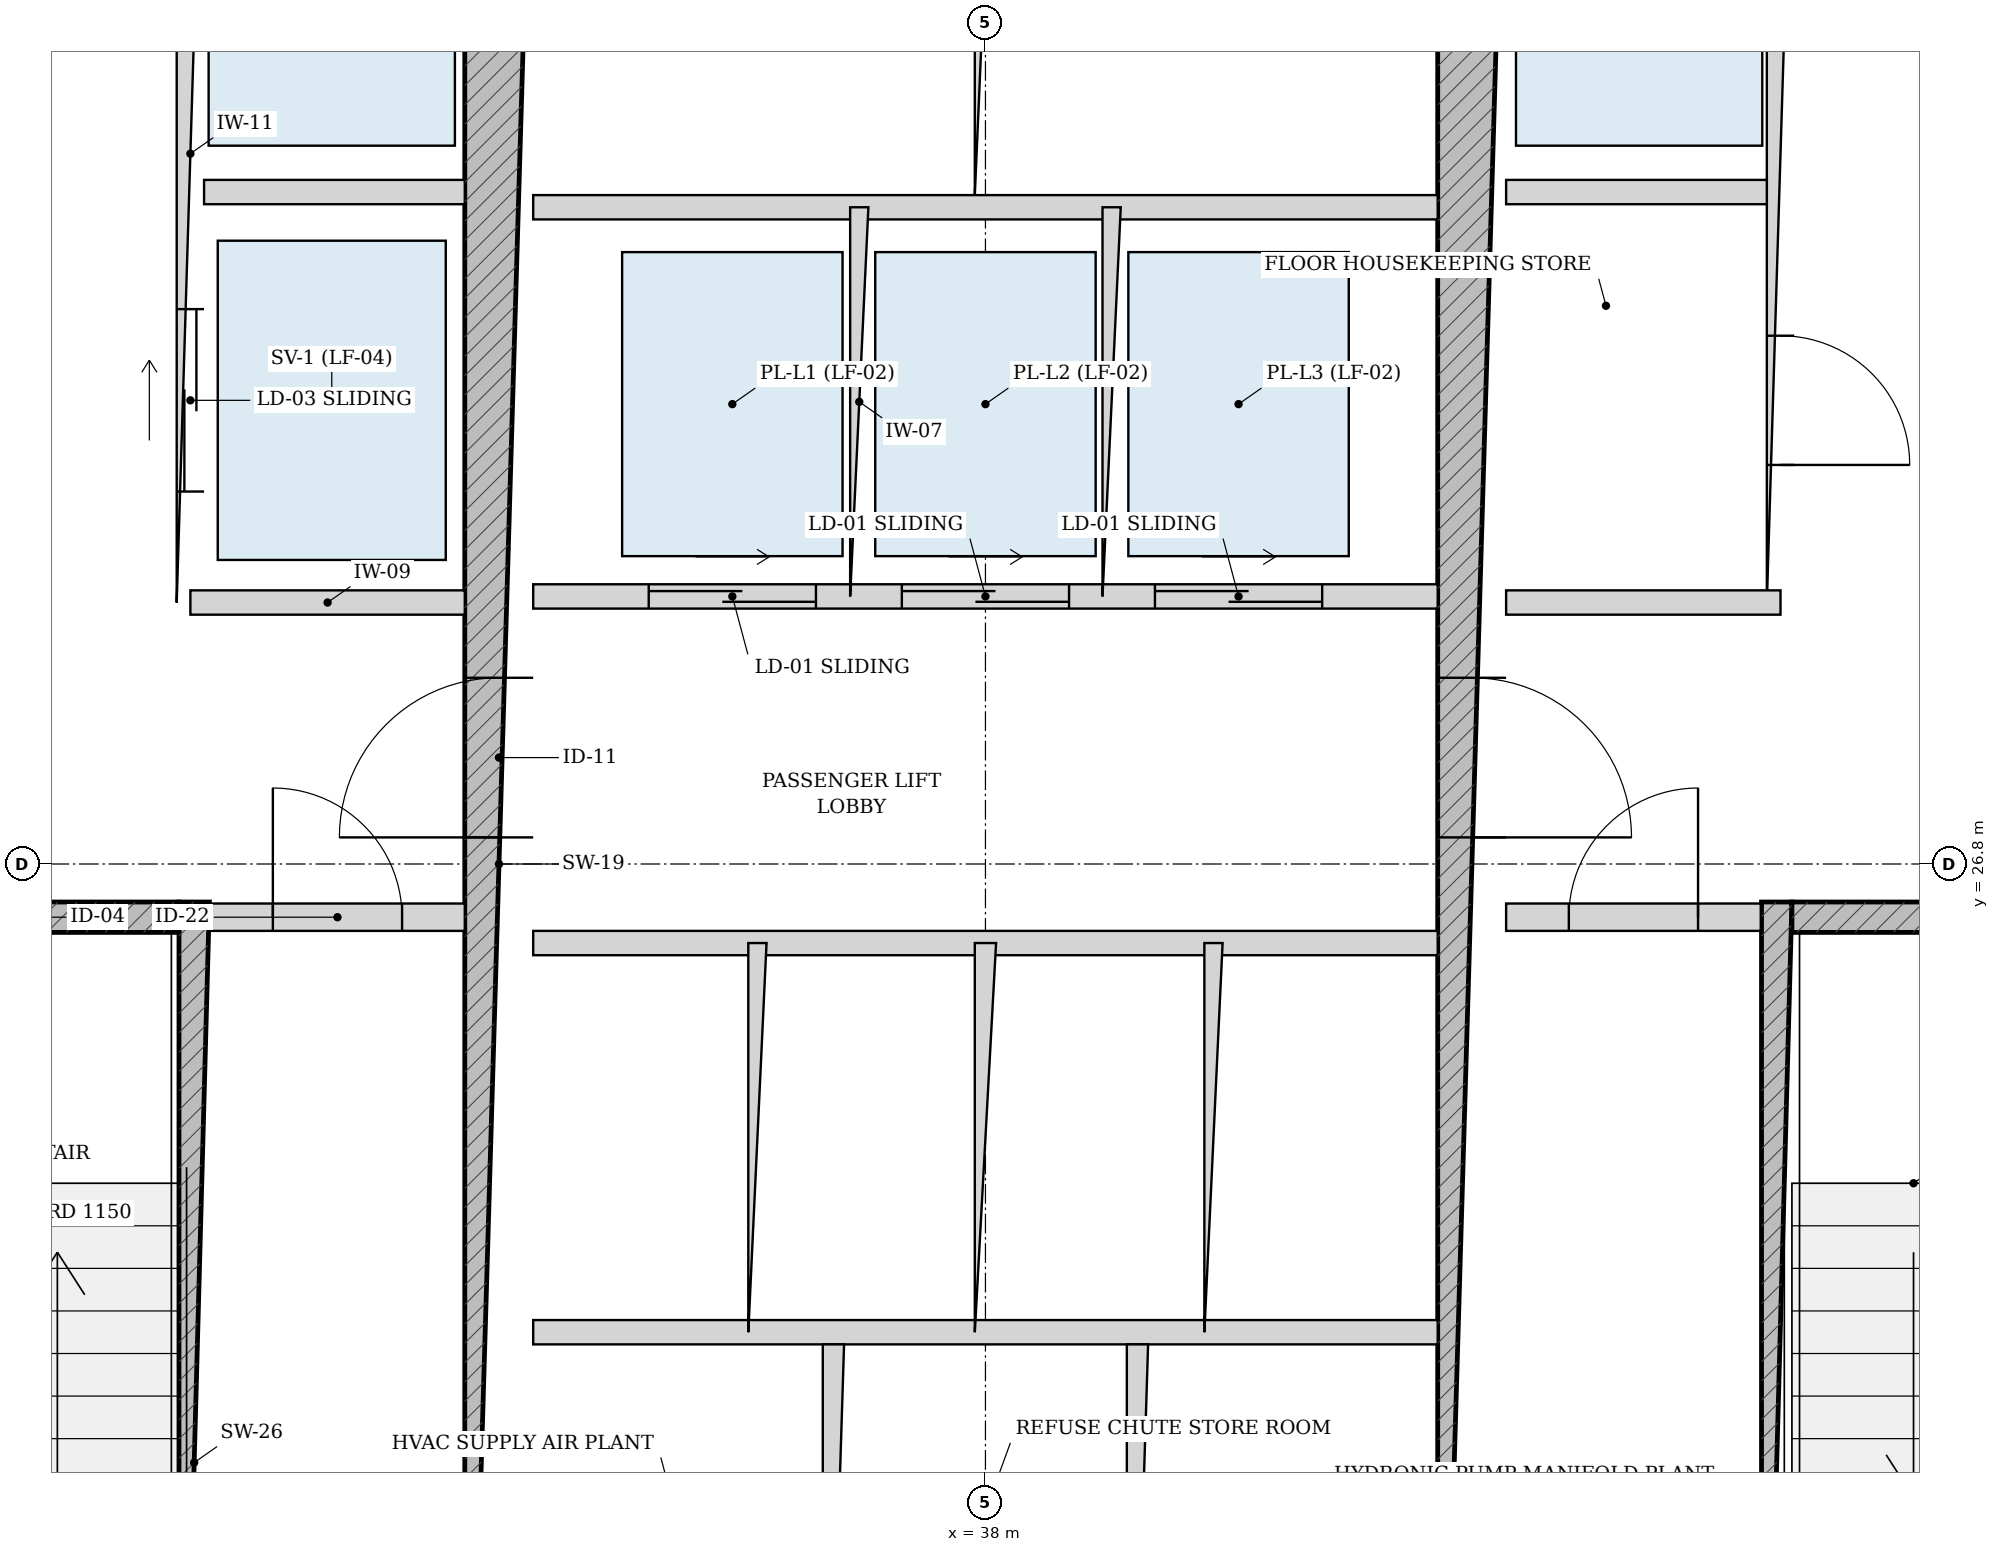
"""IFC4 building model, lengths in metres.
Left out: names, types, materials, properties, quantities, classifications, styles, units other than length and angle.
Written with IfcOpenShell. Run it as: python <this file> out.ifc"""

import sys

from ifc_helpers import new_model, si_unit, direction, frame, frame_2d, origin, place, context, subcontext, project, spatial, rectangle, extrude, source, transform, mapped, element, fill, save


model = new_model("IFC4")
c1 = context("Model", 3, precision=1e-05, world=origin(), true_north=direction((-0.2419218956, 0.970295726276)))
c2 = subcontext(c1, "Body", "Model", "MODEL_VIEW")
j1 = project(units=[si_unit("LENGTHUNIT", "METRE"), si_unit("PLANEANGLEUNIT", "RADIAN")], contexts=[c1])
p1 = place(None, origin())
s1 = spatial("IfcSite", under=j1, at=p1, CompositionType="ELEMENT")
p2 = place(p1, origin())
s2 = spatial("IfcBuilding", under=s1, at=p2, CompositionType="ELEMENT")
p3 = place(p2, frame((0.0, 0.0, 101.4)))
s3 = spatial("IfcBuildingStorey", under=s2, at=p3, CompositionType="ELEMENT", Elevation=101.4)
p4 = place(p3, frame((32.795, 19.175, 0.0), z_axis=(0.0, 0.0, 1.0), x_axis=(0.0, 1.0, 0.0)))
e1 = element("IfcWall", 1, at=p4, inside=s3, PredefinedType="SOLIDWALL", context=c2, shape_type="SweptSolid", body=[
    extrude(rectangle(XDim=7.375, YDim=0.2, at=frame_2d((3.688, 0.0))), origin(), (0.0, 0.0, 1.0), 3.325),
])
p5 = place(p3, frame((29.375, 26.45, 0.0), z_axis=(0.0, 0.0, 1.0), x_axis=(1.0, 0.0, 0.0)))
e2 = element("IfcWall", 2, at=p5, inside=s3, PredefinedType="SOLIDWALL", context=c2, shape_type="SweptSolid", body=[
    extrude(rectangle(XDim=3.32, YDim=0.2, at=frame_2d((1.66, 0.0))), origin(), (0.0, 0.0, 1.0), 3.325),
])
p6 = place(p5, frame((1.185, 0.0, 0.0)))
e3 = element("IfcOpeningElement", 3, at=p6, cuts=e2, PredefinedType="OPENING", context=c2, shape_type="SweptSolid", body=[
    extrude(rectangle(XDim=0.95, YDim=2.15, at=frame_2d((0.475, 1.075))), frame((0.0, 0.11, 0.0), z_axis=(0.0, -1.0, 0.0), x_axis=(1.0, 0.0, 0.0)), (0.0, 0.0, 1.0), 0.22),
])
p7 = place(p3, frame((43.205, 19.175, 0.0), z_axis=(0.0, 0.0, 1.0), x_axis=(0.0, 1.0, 0.0)))
e4 = element("IfcWall", 4, at=p7, inside=s3, PredefinedType="SOLIDWALL", context=c2, shape_type="SweptSolid", body=[
    extrude(rectangle(XDim=7.375, YDim=0.2, at=frame_2d((3.688, 0.0))), origin(), (0.0, 0.0, 1.0), 3.325),
])
p8 = place(p3, frame((43.305, 26.45, 0.0), z_axis=(0.0, 0.0, 1.0), x_axis=(1.0, 0.0, 0.0)))
e5 = element("IfcWall", 5, at=p8, inside=s3, PredefinedType="SOLIDWALL", context=c2, shape_type="SweptSolid", body=[
    extrude(rectangle(XDim=3.32, YDim=0.2, at=frame_2d((1.66, 0.0))), origin(), (0.0, 0.0, 1.0), 3.325),
])
p9 = place(p8, frame((1.185, 0.0, 0.0)))
e6 = element("IfcOpeningElement", 6, at=p9, cuts=e5, PredefinedType="OPENING", context=c2, shape_type="SweptSolid", body=[
    extrude(rectangle(XDim=0.95, YDim=2.15, at=frame_2d((0.475, 1.075))), frame((0.0, 0.11, 0.0), z_axis=(0.0, -1.0, 0.0), x_axis=(1.0, 0.0, 0.0)), (0.0, 0.0, 1.0), 0.22),
])
p10 = place(p3, frame((34.8, 19.175, 0.0), z_axis=(0.0, 0.0, 1.0), x_axis=(0.0, 1.0, 0.0)))
e7 = element("IfcWall", 7, at=p10, inside=s3, PredefinedType="SHEAR", context=c2, shape_type="SweptSolid", body=[
    extrude(rectangle(XDim=15.25, YDim=0.45, at=frame_2d((7.625, 0.0))), origin(), (0.0, 0.0, 1.0), 3.325),
])
p11 = place(p10, frame((7.8, 0.0, 0.0)))
e8 = element("IfcOpeningElement", 8, at=p11, cuts=e7, PredefinedType="OPENING", context=c2, shape_type="SweptSolid", body=[
    extrude(rectangle(XDim=1.05, YDim=2.15, at=frame_2d((0.525, 1.075))), frame((0.0, 0.235, 0.0), z_axis=(0.0, -1.0, 0.0), x_axis=(1.0, 0.0, 0.0)), (0.0, 0.0, 1.0), 0.47),
])
p12 = place(p3, frame((41.2, 19.175, 0.0), z_axis=(0.0, 0.0, 1.0), x_axis=(0.0, 1.0, 0.0)))
e9 = element("IfcWall", 9, at=p12, inside=s3, PredefinedType="SHEAR", context=c2, shape_type="SweptSolid", body=[
    extrude(rectangle(XDim=15.25, YDim=0.45, at=frame_2d((7.625, 0.0))), origin(), (0.0, 0.0, 1.0), 3.325),
])
p13 = place(p12, frame((7.8, 0.0, 0.0)))
e10 = element("IfcOpeningElement", 10, at=p13, cuts=e9, PredefinedType="OPENING", context=c2, shape_type="SweptSolid", body=[
    extrude(rectangle(XDim=1.05, YDim=2.15, at=frame_2d((0.525, 1.075))), frame((0.0, 0.235, 0.0), z_axis=(0.0, -1.0, 0.0), x_axis=(1.0, 0.0, 0.0)), (0.0, 0.0, 1.0), 0.47),
])
p14 = place(p3, frame((32.9, 26.45, 0.0), z_axis=(0.0, 0.0, 1.0), x_axis=(1.0, 0.0, 0.0)))
e11 = element("IfcWall", 11, at=p14, inside=s3, PredefinedType="PARTITIONING", context=c2, shape_type="SweptSolid", body=[
    extrude(rectangle(XDim=1.675, YDim=0.18, at=frame_2d((0.837, 0.0))), origin(), (0.0, 0.0, 1.0), 3.325),
])
p15 = place(p14, frame((0.413, 0.0, 0.0)))
e12 = element("IfcOpeningElement", 12, at=p15, cuts=e11, PredefinedType="OPENING", context=c2, shape_type="SweptSolid", body=[
    extrude(rectangle(XDim=0.85, YDim=2.1, at=frame_2d((0.425, 1.05))), frame((0.0, 0.1, 0.0), z_axis=(0.0, -1.0, 0.0), x_axis=(1.0, 0.0, 0.0)), (0.0, 0.0, 1.0), 0.2),
])
p16 = place(p3, frame((41.425, 26.45, 0.0), z_axis=(0.0, 0.0, 1.0), x_axis=(1.0, 0.0, 0.0)))
e13 = element("IfcWall", 13, at=p16, inside=s3, PredefinedType="PARTITIONING", context=c2, shape_type="SweptSolid", body=[
    extrude(rectangle(XDim=1.675, YDim=0.18, at=frame_2d((0.837, 0.0))), origin(), (0.0, 0.0, 1.0), 3.325),
])
p17 = place(p16, frame((0.413, 0.0, 0.0)))
e14 = element("IfcOpeningElement", 14, at=p17, cuts=e13, PredefinedType="OPENING", context=c2, shape_type="SweptSolid", body=[
    extrude(rectangle(XDim=0.85, YDim=2.1, at=frame_2d((0.425, 1.05))), frame((0.0, 0.1, 0.0), z_axis=(0.0, -1.0, 0.0), x_axis=(1.0, 0.0, 0.0)), (0.0, 0.0, 1.0), 0.2),
])
p18 = place(p3, frame((32.77, 28.52, 0.0), z_axis=(0.0, 0.0, 1.0), x_axis=(0.0, 1.0, 0.0)))
e15 = element("IfcWall", 15, at=p18, inside=s3, PredefinedType="PARTITIONING", context=c2, shape_type="SweptSolid", body=[
    extrude(rectangle(XDim=5.905, YDim=0.18, at=frame_2d((2.953, 0.0))), origin(), (0.0, 0.0, 1.0), 3.325),
])
p19 = place(p18, frame((3.655, 0.0, 0.0)))
e16 = element("IfcOpeningElement", 16, at=p19, cuts=e15, PredefinedType="OPENING", context=c2, shape_type="SweptSolid", body=[
    extrude(rectangle(XDim=1.15, YDim=2.2, at=frame_2d((0.575, 1.1))), frame((0.0, 0.1, 0.0), z_axis=(0.0, -1.0, 0.0), x_axis=(1.0, 0.0, 0.0)), (0.0, 0.0, 1.0), 0.2),
])
p20 = place(p18, frame((0.73, 0.0, 0.0)))
e17 = element("IfcOpeningElement", 17, at=p20, cuts=e15, PredefinedType="OPENING", context=c2, shape_type="SweptSolid", body=[
    extrude(rectangle(XDim=1.2, YDim=2.25, at=frame_2d((0.6, 1.125))), frame((0.0, 0.1, 0.0), z_axis=(0.0, -1.0, 0.0), x_axis=(1.0, 0.0, 0.0)), (0.0, 0.0, 1.0), 0.2),
])
p21 = place(p3, frame((32.86, 31.22, 0.0), z_axis=(0.0, 0.0, 1.0), x_axis=(1.0, 0.0, 0.0)))
e18 = element("IfcWall", 18, at=p21, inside=s3, PredefinedType="PARTITIONING", context=c2, shape_type="SweptSolid", body=[
    extrude(rectangle(XDim=1.715, YDim=0.16, at=frame_2d((0.857, 0.0))), origin(), (0.0, 0.0, 1.0), 3.325),
])
p22 = place(p3, frame((32.77, 28.52, 0.0), z_axis=(0.0, 0.0, 1.0), x_axis=(1.0, 0.0, 0.0)))
e19 = element("IfcWall", 19, at=p22, inside=s3, PredefinedType="PARTITIONING", context=c2, shape_type="SweptSolid", body=[
    extrude(rectangle(XDim=1.805, YDim=0.16, at=frame_2d((0.902, 0.0))), origin(), (0.0, 0.0, 1.0), 3.325),
])
p23 = place(p3, frame((43.23, 28.52, 0.0), z_axis=(0.0, 0.0, 1.0), x_axis=(0.0, 1.0, 0.0)))
e20 = element("IfcWall", 20, at=p23, inside=s3, PredefinedType="PARTITIONING", context=c2, shape_type="SweptSolid", body=[
    extrude(rectangle(XDim=5.905, YDim=0.18, at=frame_2d((2.953, 0.0))), origin(), (0.0, 0.0, 1.0), 3.325),
])
p24 = place(p23, frame((0.905, 0.0, 0.0)))
e21 = element("IfcOpeningElement", 21, at=p24, cuts=e20, PredefinedType="OPENING", context=c2, shape_type="SweptSolid", body=[
    extrude(rectangle(XDim=0.85, YDim=2.1, at=frame_2d((0.425, 1.05))), frame((0.0, 0.1, 0.0), z_axis=(0.0, -1.0, 0.0), x_axis=(1.0, 0.0, 0.0)), (0.0, 0.0, 1.0), 0.2),
])
p25 = place(p23, frame((3.655, 0.0, 0.0)))
e22 = element("IfcOpeningElement", 22, at=p25, cuts=e20, PredefinedType="OPENING", context=c2, shape_type="SweptSolid", body=[
    extrude(rectangle(XDim=1.15, YDim=2.2, at=frame_2d((0.575, 1.1))), frame((0.0, 0.1, 0.0), z_axis=(0.0, -1.0, 0.0), x_axis=(1.0, 0.0, 0.0)), (0.0, 0.0, 1.0), 0.2),
])
p26 = place(p3, frame((41.425, 31.22, 0.0), z_axis=(0.0, 0.0, 1.0), x_axis=(1.0, 0.0, 0.0)))
e23 = element("IfcWall", 23, at=p26, inside=s3, PredefinedType="PARTITIONING", context=c2, shape_type="SweptSolid", body=[
    extrude(rectangle(XDim=1.715, YDim=0.16, at=frame_2d((0.857, 0.0))), origin(), (0.0, 0.0, 1.0), 3.325),
])
p27 = place(p3, frame((41.425, 28.52, 0.0), z_axis=(0.0, 0.0, 1.0), x_axis=(1.0, 0.0, 0.0)))
e24 = element("IfcWall", 24, at=p27, inside=s3, PredefinedType="PARTITIONING", context=c2, shape_type="SweptSolid", body=[
    extrude(rectangle(XDim=1.805, YDim=0.16, at=frame_2d((0.902, 0.0))), origin(), (0.0, 0.0, 1.0), 3.325),
])
p28 = place(p3, frame((35.025, 28.56, 0.0), z_axis=(0.0, 0.0, 1.0), x_axis=(1.0, 0.0, 0.0)))
e25 = element("IfcWall", 25, at=p28, inside=s3, PredefinedType="PARTITIONING", context=c2, shape_type="SweptSolid", body=[
    extrude(rectangle(XDim=5.95, YDim=0.16, at=frame_2d((2.975, 0.0))), origin(), (0.0, 0.0, 1.0), 3.325),
])
p29 = place(p28, frame((0.76, 0.0, 0.0)))
e26 = element("IfcOpeningElement", 26, at=p29, cuts=e25, PredefinedType="OPENING", context=c2, shape_type="SweptSolid", body=[
    extrude(rectangle(XDim=1.1, YDim=2.2, at=frame_2d((0.55, 1.1))), frame((0.0, 0.09, 0.0), z_axis=(0.0, -1.0, 0.0), x_axis=(1.0, 0.0, 0.0)), (0.0, 0.0, 1.0), 0.18),
])
p30 = place(p28, frame((2.425, 0.0, 0.0)))
e27 = element("IfcOpeningElement", 27, at=p30, cuts=e25, PredefinedType="OPENING", context=c2, shape_type="SweptSolid", body=[
    extrude(rectangle(XDim=1.1, YDim=2.2, at=frame_2d((0.55, 1.1))), frame((0.0, 0.09, 0.0), z_axis=(0.0, -1.0, 0.0), x_axis=(1.0, 0.0, 0.0)), (0.0, 0.0, 1.0), 0.18),
])
p31 = place(p28, frame((4.09, 0.0, 0.0)))
e28 = element("IfcOpeningElement", 28, at=p31, cuts=e25, PredefinedType="OPENING", context=c2, shape_type="SweptSolid", body=[
    extrude(rectangle(XDim=1.1, YDim=2.2, at=frame_2d((0.55, 1.1))), frame((0.0, 0.09, 0.0), z_axis=(0.0, -1.0, 0.0), x_axis=(1.0, 0.0, 0.0)), (0.0, 0.0, 1.0), 0.18),
])
p32 = place(p3, frame((35.025, 31.12, 0.0), z_axis=(0.0, 0.0, 1.0), x_axis=(1.0, 0.0, 0.0)))
e29 = element("IfcWall", 29, at=p32, inside=s3, PredefinedType="PARTITIONING", context=c2, shape_type="SweptSolid", body=[
    extrude(rectangle(XDim=5.95, YDim=0.16, at=frame_2d((2.975, 0.0))), origin(), (0.0, 0.0, 1.0), 3.325),
])
for number, where, z_axis, x_axis in (
    (30, (37.17, 28.56, 0.0), (0.0, 0.0, 1.0), (0.0, 1.0, 0.0)),
    (31, (38.83, 28.56, 0.0), (0.0, 0.0, 1.0), (0.0, 1.0, 0.0)),
):
    element("IfcWall", number, at=place(p3, frame(where, z_axis=z_axis, x_axis=x_axis)), inside=s3, PredefinedType="PARTITIONING", context=c2, shape_type="SweptSolid", body=[
        extrude(rectangle(XDim=2.56, YDim=0.12, at=frame_2d((1.28, 0.0))), origin(), (0.0, 0.0, 1.0), 3.325),
    ])
p33 = place(p3, frame((38.0, 31.2, 0.0), z_axis=(0.0, 0.0, 1.0), x_axis=(0.0, 1.0, 0.0)))
e32 = element("IfcWall", 32, at=p33, inside=s3, PredefinedType="PARTITIONING", context=c2, shape_type="SweptSolid", body=[
    extrude(rectangle(XDim=3.225, YDim=0.14, at=frame_2d((1.613, 0.0))), origin(), (0.0, 0.0, 1.0), 3.325),
])
for number, where, z_axis, x_axis in (
    (33, (35.025, 26.28, 0.0), (0.0, 0.0, 1.0), (1.0, 0.0, 0.0)),
    (34, (35.025, 23.72, 0.0), (0.0, 0.0, 1.0), (1.0, 0.0, 0.0)),
):
    element("IfcWall", number, at=place(p3, frame(where, z_axis=z_axis, x_axis=x_axis)), inside=s3, PredefinedType="PARTITIONING", context=c2, shape_type="SweptSolid", body=[
        extrude(rectangle(XDim=5.95, YDim=0.16, at=frame_2d((2.975, 0.0))), origin(), (0.0, 0.0, 1.0), 3.325),
    ])
p34 = place(p3, frame((36.5, 23.72, 0.0), z_axis=(0.0, 0.0, 1.0), x_axis=(0.0, 1.0, 0.0)))
e35 = element("IfcWall", 35, at=p34, inside=s3, PredefinedType="PARTITIONING", context=c2, shape_type="SweptSolid", body=[
    extrude(rectangle(XDim=2.56, YDim=0.12, at=frame_2d((1.28, 0.0))), origin(), (0.0, 0.0, 1.0), 3.325),
])
p35 = place(p3, frame((38.0, 23.72, 0.0), z_axis=(0.0, 0.0, 1.0), x_axis=(0.0, 1.0, 0.0)))
e36 = element("IfcWall", 36, at=p35, inside=s3, PredefinedType="PARTITIONING", context=c2, shape_type="SweptSolid", body=[
    extrude(rectangle(XDim=2.56, YDim=0.14, at=frame_2d((1.28, 0.0))), origin(), (0.0, 0.0, 1.0), 3.325),
])
p36 = place(p3, frame((39.5, 23.72, 0.0), z_axis=(0.0, 0.0, 1.0), x_axis=(0.0, 1.0, 0.0)))
e37 = element("IfcWall", 37, at=p36, inside=s3, PredefinedType="PARTITIONING", context=c2, shape_type="SweptSolid", body=[
    extrude(rectangle(XDim=2.56, YDim=0.12, at=frame_2d((1.28, 0.0))), origin(), (0.0, 0.0, 1.0), 3.325),
])
p37 = place(p3, frame((37.0, 19.175, 0.0), z_axis=(0.0, 0.0, 1.0), x_axis=(0.0, 1.0, 0.0)))
e38 = element("IfcWall", 38, at=p37, inside=s3, PredefinedType="PARTITIONING", context=c2, shape_type="SweptSolid", body=[
    extrude(rectangle(XDim=4.465, YDim=0.14, at=frame_2d((2.232, 0.0))), origin(), (0.0, 0.0, 1.0), 3.325),
])
p38 = place(p37, frame((1.808, 0.0, 0.0)))
e39 = element("IfcOpeningElement", 39, at=p38, cuts=e38, PredefinedType="OPENING", context=c2, shape_type="SweptSolid", body=[
    extrude(rectangle(XDim=0.85, YDim=2.1, at=frame_2d((0.425, 1.05))), frame((0.0, 0.08, 0.0), z_axis=(0.0, -1.0, 0.0), x_axis=(1.0, 0.0, 0.0)), (0.0, 0.0, 1.0), 0.16),
])
p39 = place(p3, frame((39.0, 19.175, 0.0), z_axis=(0.0, 0.0, 1.0), x_axis=(0.0, 1.0, 0.0)))
e40 = element("IfcWall", 40, at=p39, inside=s3, PredefinedType="PARTITIONING", context=c2, shape_type="SweptSolid", body=[
    extrude(rectangle(XDim=4.465, YDim=0.14, at=frame_2d((2.232, 0.0))), origin(), (0.0, 0.0, 1.0), 3.325),
])
p40 = place(p39, frame((1.808, 0.0, 0.0)))
e41 = element("IfcOpeningElement", 41, at=p40, cuts=e40, PredefinedType="OPENING", context=c2, shape_type="SweptSolid", body=[
    extrude(rectangle(XDim=0.85, YDim=2.1, at=frame_2d((0.425, 1.05))), frame((0.0, 0.08, 0.0), z_axis=(0.0, -1.0, 0.0), x_axis=(1.0, 0.0, 0.0)), (0.0, 0.0, 1.0), 0.16),
])
m1 = source(origin(), c2, "Body", "SweptSolid", [
    extrude(rectangle(XDim=1.05, YDim=2.15, at=frame_2d((0.525, 1.075))), frame((0.0, 0.025, 0.0), z_axis=(0.0, -1.0, 0.0), x_axis=(1.0, 0.0, 0.0)), (0.0, 0.0, 1.0), 0.05),
])
p41 = place(p11, origin())
e42 = element("IfcDoor", 42, at=p41, inside=s3, OperationType="SINGLE_SWING_LEFT", PredefinedType="DOOR", context=c2, shape_type="MappedRepresentation", body=[
    mapped(m1, transform((0.0, 0.0, 0.0), scale=1.0)),
])
fill(e8, e42)
p42 = place(p13, frame((1.05, 0.0, 0.0), z_axis=(0.0, 0.0, 1.0), x_axis=(-1.0, 0.0, 0.0)))
e43 = element("IfcDoor", 43, at=p42, inside=s3, OperationType="SINGLE_SWING_RIGHT", PredefinedType="DOOR", context=c2, shape_type="MappedRepresentation", body=[
    mapped(m1, transform((0.0, 0.0, 0.0), scale=1.0)),
])
fill(e10, e43)
m2 = source(origin(), c2, "Body", "SweptSolid", [
    extrude(rectangle(XDim=0.85, YDim=2.1, at=frame_2d((0.425, 1.05))), frame((0.0, 0.025, 0.0), z_axis=(0.0, -1.0, 0.0), x_axis=(1.0, 0.0, 0.0)), (0.0, 0.0, 1.0), 0.05),
])
p43 = place(p15, origin())
e44 = element("IfcDoor", 44, at=p43, inside=s3, OperationType="SINGLE_SWING_LEFT", PredefinedType="DOOR", context=c2, shape_type="MappedRepresentation", body=[
    mapped(m2, transform((0.0, 0.0, 0.0), scale=1.0)),
])
fill(e12, e44)
p44 = place(p17, origin())
e45 = element("IfcDoor", 45, at=p44, inside=s3, OperationType="SINGLE_SWING_RIGHT", PredefinedType="DOOR", context=c2, shape_type="MappedRepresentation", body=[
    mapped(m2, transform((0.0, 0.0, 0.0), scale=1.0)),
])
fill(e14, e45)
p45 = place(p24, frame((0.85, 0.0, 0.0), z_axis=(0.0, 0.0, 1.0), x_axis=(-1.0, 0.0, 0.0)))
e46 = element("IfcDoor", 46, at=p45, inside=s3, OperationType="SINGLE_SWING_RIGHT", PredefinedType="DOOR", context=c2, shape_type="MappedRepresentation", body=[
    mapped(m2, transform((0.0, 0.0, 0.0), scale=1.0)),
])
fill(e21, e46)
m3 = source(origin(), c2, "Body", "SweptSolid", [
    extrude(rectangle(XDim=1.2, YDim=2.25, at=frame_2d((0.6, 1.125))), frame((0.0, 0.025, 0.0), z_axis=(0.0, -1.0, 0.0), x_axis=(1.0, 0.0, 0.0)), (0.0, 0.0, 1.0), 0.05),
])
p46 = place(p20, origin())
e47 = element("IfcDoor", 47, at=p46, inside=s3, OperationType="DOUBLE_DOOR_SLIDING", PredefinedType="DOOR", context=c2, shape_type="MappedRepresentation", body=[
    mapped(m3, transform((0.0, 0.0, 0.0), scale=1.0)),
])
fill(e17, e47)
m4 = source(origin(), c2, "Body", "SweptSolid", [
    extrude(rectangle(XDim=1.1, YDim=2.2, at=frame_2d((0.55, 1.1))), frame((0.0, 0.025, 0.0), z_axis=(0.0, -1.0, 0.0), x_axis=(1.0, 0.0, 0.0)), (0.0, 0.0, 1.0), 0.05),
])
p47 = place(p29, origin())
e48 = element("IfcDoor", 48, at=p47, inside=s3, OperationType="DOUBLE_DOOR_SLIDING", PredefinedType="DOOR", context=c2, shape_type="MappedRepresentation", body=[
    mapped(m4, transform((0.0, 0.0, 0.0), scale=1.0)),
])
fill(e26, e48)
p48 = place(p30, origin())
e49 = element("IfcDoor", 49, at=p48, inside=s3, OperationType="DOUBLE_DOOR_SLIDING", PredefinedType="DOOR", context=c2, shape_type="MappedRepresentation", body=[
    mapped(m4, transform((0.0, 0.0, 0.0), scale=1.0)),
])
fill(e27, e49)
p49 = place(p31, origin())
e50 = element("IfcDoor", 50, at=p49, inside=s3, OperationType="DOUBLE_DOOR_SLIDING", PredefinedType="DOOR", context=c2, shape_type="MappedRepresentation", body=[
    mapped(m4, transform((0.0, 0.0, 0.0), scale=1.0)),
])
fill(e28, e50)
save(model, sys.argv[1])
